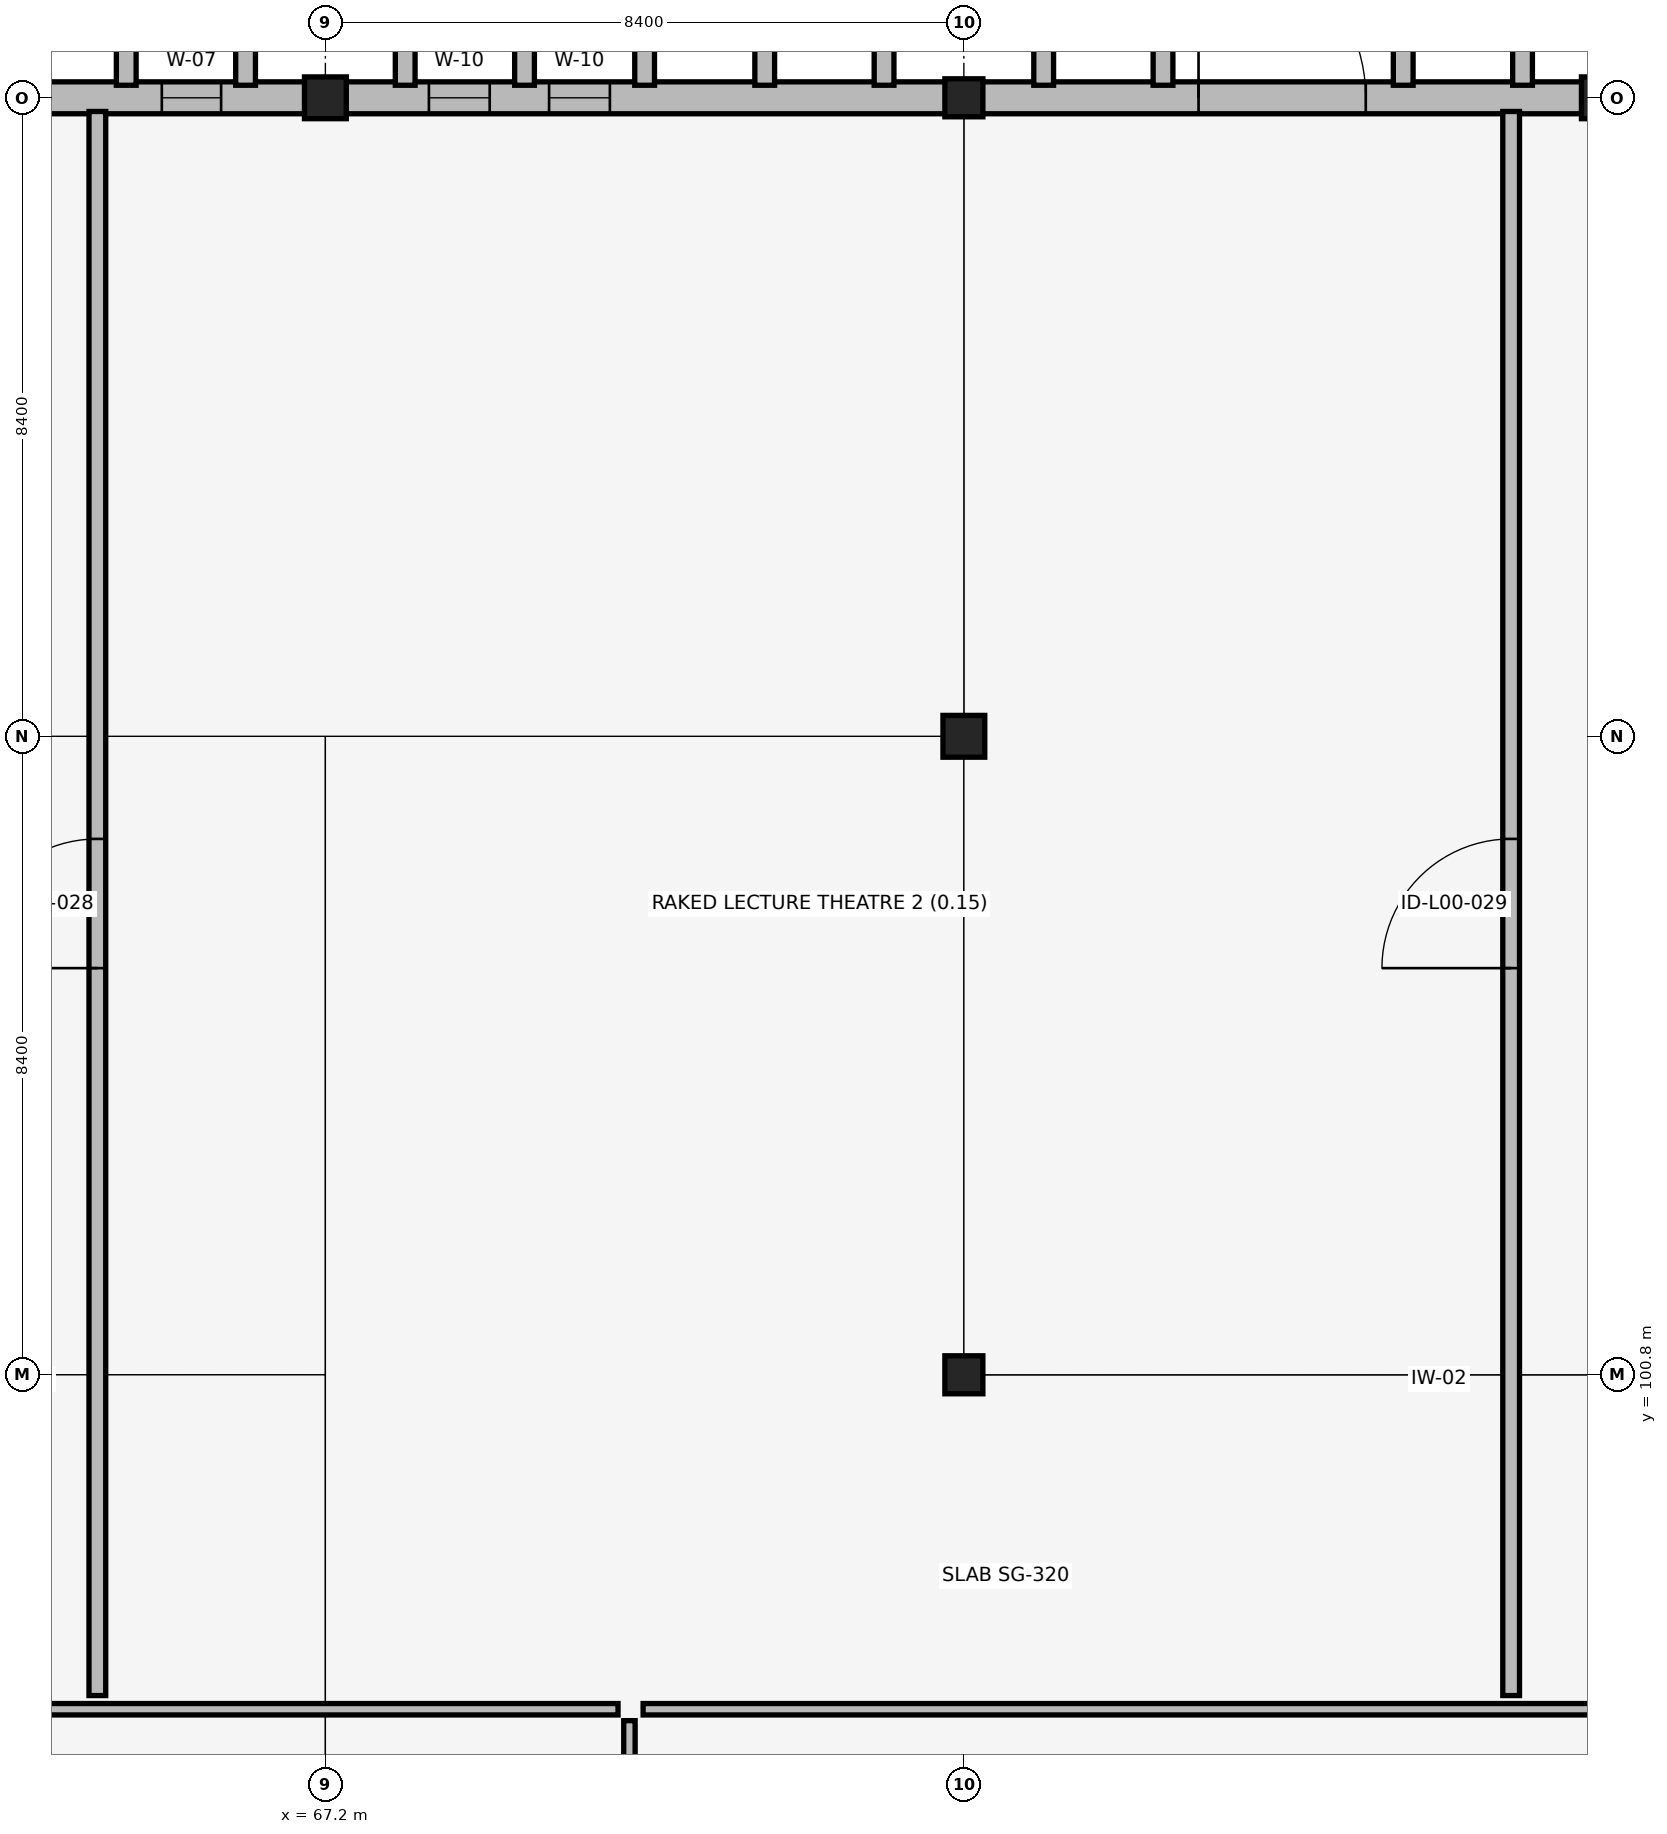
"""IFC4 building model, lengths in metres.
Left out: names, types, materials, properties, quantities, classifications, styles, units other than length and angle.
Written with IfcOpenShell. Run it as: python <this file> out.ifc"""

import sys

from ifc_helpers import new_model, si_unit, direction, frame, frame_2d, origin, origin_2d, place, context, subcontext, project, spatial, rectangle, extrude, element, fill, save


model = new_model("IFC4")
c1 = context("Model", 3, precision=1e-05, world=origin(), true_north=direction((0.0, 1.0)))
c2 = subcontext(c1, "Body", "Model", "MODEL_VIEW")
j1 = project(units=[si_unit("LENGTHUNIT", "METRE"), si_unit("PLANEANGLEUNIT", "RADIAN")], contexts=[c1])
p1 = place(None, origin())
s1 = spatial("IfcSite", under=j1, at=p1, CompositionType="ELEMENT")
p2 = place(p1, origin())
s2 = spatial("IfcBuilding", under=s1, at=p2, CompositionType="ELEMENT")
p3 = place(p2, origin())
s3 = spatial("IfcBuildingStorey", under=s2, at=p3, CompositionType="ELEMENT", Elevation=0.0)
p4 = place(p3, frame((67.2, 117.6, -0.32), z_axis=(0.0, 0.0, 1.0), x_axis=(1.0, 0.0, 0.0)))
e1 = element("IfcColumn", 1, at=p4, inside=s3, PredefinedType="COLUMN", context=c2, shape_type="SweptSolid", body=[
    extrude(rectangle(XDim=0.55, YDim=0.55, at=origin_2d()), origin(), (0.0, 0.0, 1.0), 5.46),
])
p5 = place(p3, frame((75.6, 100.8, -0.32), z_axis=(0.0, 0.0, 1.0), x_axis=(1.0, 0.0, 0.0)))
e2 = element("IfcColumn", 2, at=p5, inside=s3, PredefinedType="COLUMN", context=c2, shape_type="SweptSolid", body=[
    extrude(rectangle(XDim=0.5, YDim=0.5, at=origin_2d()), origin(), (0.0, 0.0, 1.0), 5.46),
])
p6 = place(p3, frame((75.6, 109.2, -0.32), z_axis=(0.0, 0.0, 1.0), x_axis=(1.0, 0.0, 0.0)))
e3 = element("IfcColumn", 3, at=p6, inside=s3, PredefinedType="COLUMN", context=c2, shape_type="SweptSolid", body=[
    extrude(rectangle(XDim=0.55, YDim=0.55, at=origin_2d()), origin(), (0.0, 0.0, 1.0), 5.46),
])
p7 = place(p3, frame((75.6, 117.6, -0.32), z_axis=(0.0, 0.0, 1.0), x_axis=(1.0, 0.0, 0.0)))
e4 = element("IfcColumn", 4, at=p7, inside=s3, PredefinedType="COLUMN", context=c2, shape_type="SweptSolid", body=[
    extrude(rectangle(XDim=0.5, YDim=0.5, at=origin_2d()), origin(), (0.0, 0.0, 1.0), 5.46),
])
p8 = place(p3, frame((84.0, 117.6, -0.32), z_axis=(0.0, 0.0, 1.0), x_axis=(1.0, 0.0, 0.0)))
e5 = element("IfcColumn", 5, at=p8, inside=s3, PredefinedType="COLUMN", context=c2, shape_type="SweptSolid", body=[
    extrude(rectangle(XDim=0.55, YDim=0.55, at=origin_2d()), origin(), (0.0, 0.0, 1.0), 5.46),
])
p9 = place(p3, frame((59.035, 117.6, 0.0), z_axis=(0.0, 0.0, 1.0), x_axis=(1.0, 0.0, 0.0)))
e6 = element("IfcWall", 6, at=p9, inside=s3, PredefinedType="SOLIDWALL", context=c2, shape_type="SweptSolid", body=[
    extrude(rectangle(XDim=7.905, YDim=0.42, at=frame_2d((3.953, 0.0))), origin(), (0.0, 0.0, 1.0), 4.4),
])
p10 = place(p9, frame((2.693, 0.0, 0.75)))
e7 = element("IfcOpeningElement", 7, at=p10, cuts=e6, PredefinedType="OPENING", context=c2, shape_type="SweptSolid", body=[
    extrude(rectangle(XDim=0.78, YDim=2.7, at=frame_2d((0.39, 1.35))), frame((0.0, 0.22, 0.0), z_axis=(0.0, -1.0, 0.0), x_axis=(1.0, 0.0, 0.0)), (0.0, 0.0, 1.0), 0.44),
])
p11 = place(p9, frame((6.013, 0.0, 0.75)))
e8 = element("IfcOpeningElement", 8, at=p11, cuts=e6, PredefinedType="OPENING", context=c2, shape_type="SweptSolid", body=[
    extrude(rectangle(XDim=0.78, YDim=2.7, at=frame_2d((0.39, 1.35))), frame((0.0, 0.22, 0.0), z_axis=(0.0, -1.0, 0.0), x_axis=(1.0, 0.0, 0.0)), (0.0, 0.0, 1.0), 0.44),
])
for number, where, z_axis, x_axis in (
    (9, (64.58, 117.765, -0.32), (0.0, 0.0, 1.0), (0.0, 1.0, 0.0)),
    (10, (66.15, 117.765, -0.32), (0.0, 0.0, 1.0), (0.0, 1.0, 0.0)),
):
    element("IfcWall", number, at=place(p3, frame(where, z_axis=z_axis, x_axis=x_axis)), inside=s3, PredefinedType="SOLIDWALL", context=c2, shape_type="SweptSolid", body=[
        extrude(rectangle(XDim=0.7, YDim=0.26, at=frame_2d((0.35, 0.0))), origin(), (0.0, 0.0, 1.0), 5.76),
    ])
p12 = place(p3, frame((67.46, 117.6, 0.0), z_axis=(0.0, 0.0, 1.0), x_axis=(1.0, 0.0, 0.0)))
e11 = element("IfcWall", 11, at=p12, inside=s3, PredefinedType="SOLIDWALL", context=c2, shape_type="SweptSolid", body=[
    extrude(rectangle(XDim=7.905, YDim=0.42, at=frame_2d((3.953, 0.0))), origin(), (0.0, 0.0, 1.0), 4.4),
])
p13 = place(p12, frame((1.102, 0.0, 0.75)))
e12 = element("IfcOpeningElement", 12, at=p13, cuts=e11, PredefinedType="OPENING", context=c2, shape_type="SweptSolid", body=[
    extrude(rectangle(XDim=0.8, YDim=2.55, at=frame_2d((0.4, 1.275))), frame((0.0, 0.22, 0.0), z_axis=(0.0, -1.0, 0.0), x_axis=(1.0, 0.0, 0.0)), (0.0, 0.0, 1.0), 0.44),
])
p14 = place(p12, frame((2.683, 0.0, 0.75)))
e13 = element("IfcOpeningElement", 13, at=p14, cuts=e11, PredefinedType="OPENING", context=c2, shape_type="SweptSolid", body=[
    extrude(rectangle(XDim=0.8, YDim=2.55, at=frame_2d((0.4, 1.275))), frame((0.0, 0.22, 0.0), z_axis=(0.0, -1.0, 0.0), x_axis=(1.0, 0.0, 0.0)), (0.0, 0.0, 1.0), 0.44),
])
for number, where, z_axis, x_axis in (
    (14, (68.25, 117.765, -0.32), (0.0, 0.0, 1.0), (0.0, 1.0, 0.0)),
    (15, (69.82, 117.765, -0.32), (0.0, 0.0, 1.0), (0.0, 1.0, 0.0)),
    (16, (71.4, 117.765, -0.32), (0.0, 0.0, 1.0), (0.0, 1.0, 0.0)),
    (17, (72.98, 117.765, -0.32), (0.0, 0.0, 1.0), (0.0, 1.0, 0.0)),
    (18, (74.55, 117.765, -0.32), (0.0, 0.0, 1.0), (0.0, 1.0, 0.0)),
):
    element("IfcWall", number, at=place(p3, frame(where, z_axis=z_axis, x_axis=x_axis)), inside=s3, PredefinedType="SOLIDWALL", context=c2, shape_type="SweptSolid", body=[
        extrude(rectangle(XDim=0.7, YDim=0.26, at=frame_2d((0.35, 0.0))), origin(), (0.0, 0.0, 1.0), 5.76),
    ])
p15 = place(p3, frame((75.835, 117.6, 0.0), z_axis=(0.0, 0.0, 1.0), x_axis=(1.0, 0.0, 0.0)))
e19 = element("IfcWall", 19, at=p15, inside=s3, PredefinedType="SOLIDWALL", context=c2, shape_type="SweptSolid", body=[
    extrude(rectangle(XDim=7.905, YDim=0.42, at=frame_2d((3.953, 0.0))), origin(), (0.0, 0.0, 1.0), 4.4),
])
p16 = place(p15, frame((2.853, 0.0, 0.0)))
e20 = element("IfcOpeningElement", 20, at=p16, cuts=e19, PredefinedType="OPENING", context=c2, shape_type="SweptSolid", body=[
    extrude(rectangle(XDim=2.2, YDim=2.4, at=frame_2d((1.1, 1.2))), frame((0.0, 0.22, 0.0), z_axis=(0.0, -1.0, 0.0), x_axis=(1.0, 0.0, 0.0)), (0.0, 0.0, 1.0), 0.44),
])
for number, where, z_axis, x_axis in (
    (21, (76.65, 117.765, -0.32), (0.0, 0.0, 1.0), (0.0, 1.0, 0.0)),
    (22, (78.22, 117.765, -0.32), (0.0, 0.0, 1.0), (0.0, 1.0, 0.0)),
    (23, (81.38, 117.765, -0.32), (0.0, 0.0, 1.0), (0.0, 1.0, 0.0)),
    (24, (82.95, 117.765, -0.32), (0.0, 0.0, 1.0), (0.0, 1.0, 0.0)),
):
    element("IfcWall", number, at=place(p3, frame(where, z_axis=z_axis, x_axis=x_axis)), inside=s3, PredefinedType="SOLIDWALL", context=c2, shape_type="SweptSolid", body=[
        extrude(rectangle(XDim=0.7, YDim=0.26, at=frame_2d((0.35, 0.0))), origin(), (0.0, 0.0, 1.0), 5.76),
    ])
p17 = place(p3, frame((50.75, 96.4, 0.0), z_axis=(0.0, 0.0, 1.0), x_axis=(1.0, 0.0, 0.0)))
e25 = element("IfcWall", 25, at=p17, inside=s3, PredefinedType="PARTITIONING", context=c2, shape_type="SweptSolid", body=[
    extrude(rectangle(XDim=20.3, YDim=0.15, at=frame_2d((10.15, 0.0))), origin(), (0.0, 0.0, 1.0), 4.74),
])
p18 = place(p3, frame((71.2, 87.45, 0.0), z_axis=(0.0, 0.0, 1.0), x_axis=(0.0, 1.0, 0.0)))
e26 = element("IfcWall", 26, at=p18, inside=s3, PredefinedType="PARTITIONING", context=c2, shape_type="SweptSolid", body=[
    extrude(rectangle(XDim=8.8, YDim=0.15, at=frame_2d((4.4, 0.0))), origin(), (0.0, 0.0, 1.0), 4.46),
])
p19 = place(p3, frame((71.38, 96.4, 0.0), z_axis=(0.0, 0.0, 1.0), x_axis=(1.0, 0.0, 0.0)))
e27 = element("IfcWall", 27, at=p19, inside=s3, PredefinedType="PARTITIONING", context=c2, shape_type="SweptSolid", body=[
    extrude(rectangle(XDim=20.67, YDim=0.15, at=frame_2d((10.335, 0.0))), origin(), (0.0, 0.0, 1.0), 4.74),
])
p20 = place(p3, frame((64.2, 96.58, 0.0), z_axis=(0.0, 0.0, 1.0), x_axis=(0.0, 1.0, 0.0)))
e28 = element("IfcWall", 28, at=p20, inside=s3, PredefinedType="PARTITIONING", context=c2, shape_type="SweptSolid", body=[
    extrude(rectangle(XDim=20.84, YDim=0.22, at=frame_2d((10.42, 0.0))), origin(), (0.0, 0.0, 1.0), 3.74),
])
p21 = place(p20, frame((9.57, 0.0, 0.0)))
e29 = element("IfcOpeningElement", 29, at=p21, cuts=e28, PredefinedType="OPENING", context=c2, shape_type="SweptSolid", body=[
    extrude(rectangle(XDim=1.7, YDim=2.25, at=frame_2d((0.85, 1.125))), frame((0.0, 0.12, 0.0), z_axis=(0.0, -1.0, 0.0), x_axis=(1.0, 0.0, 0.0)), (0.0, 0.0, 1.0), 0.24),
])
p22 = place(p3, frame((82.8, 96.58, 0.0), z_axis=(0.0, 0.0, 1.0), x_axis=(0.0, 1.0, 0.0)))
e30 = element("IfcWall", 30, at=p22, inside=s3, PredefinedType="PARTITIONING", context=c2, shape_type="SweptSolid", body=[
    extrude(rectangle(XDim=20.84, YDim=0.22, at=frame_2d((10.42, 0.0))), origin(), (0.0, 0.0, 1.0), 3.74),
])
p23 = place(p22, frame((9.57, 0.0, 0.0)))
e31 = element("IfcOpeningElement", 31, at=p23, cuts=e30, PredefinedType="OPENING", context=c2, shape_type="SweptSolid", body=[
    extrude(rectangle(XDim=1.7, YDim=2.25, at=frame_2d((0.85, 1.125))), frame((0.0, 0.12, 0.0), z_axis=(0.0, -1.0, 0.0), x_axis=(1.0, 0.0, 0.0)), (0.0, 0.0, 1.0), 0.24),
])
p24 = place(p11, origin())
e32 = element("IfcWindow", 32, at=p24, inside=s3, PartitioningType="DOUBLE_PANEL_VERTICAL", PredefinedType="WINDOW", context=c2, shape_type="SweptSolid", body=[
    extrude(rectangle(XDim=0.78, YDim=2.7, at=frame_2d((0.39, 1.35))), frame((0.0, 0.03, 0.0), z_axis=(0.0, -1.0, 0.0), x_axis=(1.0, 0.0, 0.0)), (0.0, 0.0, 1.0), 0.06),
])
fill(e8, e32)
p25 = place(p13, origin())
e33 = element("IfcWindow", 33, at=p25, inside=s3, PartitioningType="DOUBLE_PANEL_VERTICAL", PredefinedType="WINDOW", context=c2, shape_type="SweptSolid", body=[
    extrude(rectangle(XDim=0.8, YDim=2.55, at=frame_2d((0.4, 1.275))), frame((0.0, 0.03, 0.0), z_axis=(0.0, -1.0, 0.0), x_axis=(1.0, 0.0, 0.0)), (0.0, 0.0, 1.0), 0.06),
])
fill(e12, e33)
p26 = place(p14, origin())
e34 = element("IfcWindow", 34, at=p26, inside=s3, PartitioningType="DOUBLE_PANEL_VERTICAL", PredefinedType="WINDOW", context=c2, shape_type="SweptSolid", body=[
    extrude(rectangle(XDim=0.8, YDim=2.55, at=frame_2d((0.4, 1.275))), frame((0.0, 0.03, 0.0), z_axis=(0.0, -1.0, 0.0), x_axis=(1.0, 0.0, 0.0)), (0.0, 0.0, 1.0), 0.06),
])
fill(e13, e34)
p27 = place(p16, origin())
e35 = element("IfcDoor", 35, at=p27, inside=s3, OperationType="DOUBLE_DOOR_SINGLE_SWING", PredefinedType="DOOR", context=c2, shape_type="SweptSolid", body=[
    extrude(rectangle(XDim=2.2, YDim=2.4, at=frame_2d((1.1, 1.2))), frame((0.0, 0.025, 0.0), z_axis=(0.0, -1.0, 0.0), x_axis=(1.0, 0.0, 0.0)), (0.0, 0.0, 1.0), 0.05),
])
fill(e20, e35)
p28 = place(p21, origin())
e36 = element("IfcDoor", 36, at=p28, inside=s3, OperationType="DOUBLE_DOOR_SINGLE_SWING", PredefinedType="DOOR", context=c2, shape_type="SweptSolid", body=[
    extrude(rectangle(XDim=1.7, YDim=2.25, at=frame_2d((0.85, 1.125))), frame((0.0, 0.025, 0.0), z_axis=(0.0, -1.0, 0.0), x_axis=(1.0, 0.0, 0.0)), (0.0, 0.0, 1.0), 0.05),
])
fill(e29, e36)
p29 = place(p23, origin())
e37 = element("IfcDoor", 37, at=p29, inside=s3, OperationType="DOUBLE_DOOR_SINGLE_SWING", PredefinedType="DOOR", context=c2, shape_type="SweptSolid", body=[
    extrude(rectangle(XDim=1.7, YDim=2.25, at=frame_2d((0.85, 1.125))), frame((0.0, 0.025, 0.0), z_axis=(0.0, -1.0, 0.0), x_axis=(1.0, 0.0, 0.0)), (0.0, 0.0, 1.0), 0.05),
])
fill(e31, e37)
save(model, sys.argv[1])
